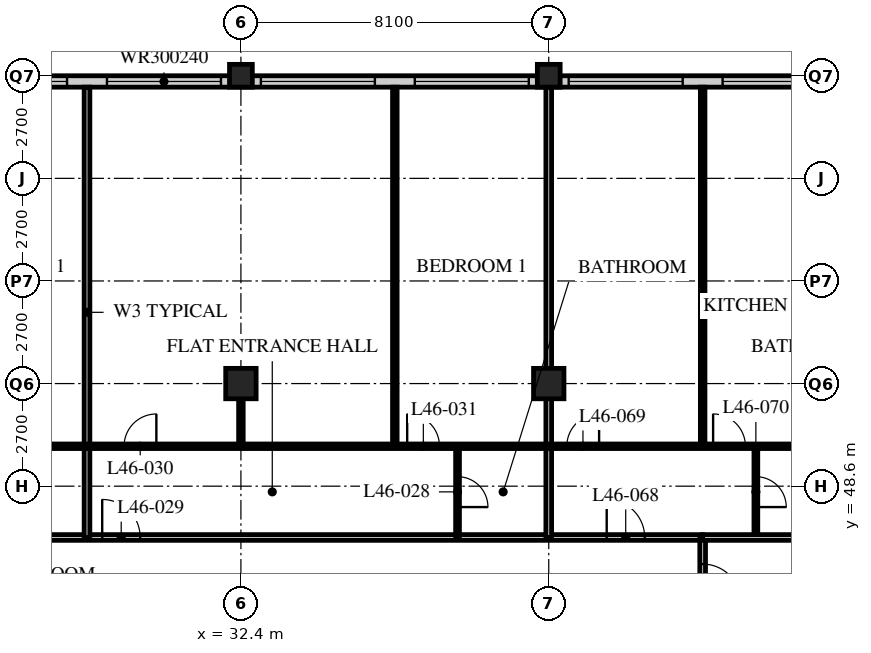
"""IFC4 building model, lengths in metres.
Left out: names, types, materials, properties, quantities, classifications, styles, units other than length and angle.
Written with IfcOpenShell. Run it as: python <this file> out.ifc"""

import sys

from ifc_helpers import new_model, si_unit, direction, frame, frame_2d, origin, origin_2d, place, context, subcontext, project, spatial, rectangle, hollow_rectangle, extrude, element, fill, save


model = new_model("IFC4")
c1 = context("Model", 3, precision=1e-05, world=origin(), true_north=direction((0.0, 1.0)))
c2 = subcontext(c1, "Body", "Model", "MODEL_VIEW")
j1 = project(units=[si_unit("LENGTHUNIT", "METRE"), si_unit("PLANEANGLEUNIT", "RADIAN")], contexts=[c1])
p1 = place(None, origin())
s1 = spatial("IfcSite", under=j1, at=p1, CompositionType="ELEMENT")
p2 = place(p1, origin())
s2 = spatial("IfcBuilding", under=s1, at=p2, CompositionType="ELEMENT")
p3 = place(p2, frame((0.0, 0.0, 181.2)))
s3 = spatial("IfcBuildingStorey", under=s2, at=p3, CompositionType="ELEMENT", Elevation=181.2)
p4 = place(p3, frame((32.4, 51.3, 0.0), z_axis=(0.0, 0.0, 1.0), x_axis=(1.0, 0.0, 0.0)))
e1 = element("IfcColumn", 1, at=p4, inside=s3, PredefinedType="COLUMN", context=c2, shape_type="SweptSolid", body=[
    extrude(hollow_rectangle(XDim=0.8, YDim=0.8, WallThickness=0.08, at=origin_2d()), origin(), (0.0, 0.0, 1.0), 3.6),
])
p5 = place(p3, frame((32.4, 59.4, 0.0), z_axis=(0.0, 0.0, 1.0), x_axis=(1.0, 0.0, 0.0)))
e2 = element("IfcColumn", 2, at=p5, inside=s3, PredefinedType="COLUMN", context=c2, shape_type="SweptSolid", body=[
    extrude(hollow_rectangle(XDim=0.6, YDim=0.6, WallThickness=0.05, at=origin_2d()), origin(), (0.0, 0.0, 1.0), 3.6),
])
p6 = place(p3, frame((40.5, 51.3, 0.0), z_axis=(0.0, 0.0, 1.0), x_axis=(1.0, 0.0, 0.0)))
e3 = element("IfcColumn", 3, at=p6, inside=s3, PredefinedType="COLUMN", context=c2, shape_type="SweptSolid", body=[
    extrude(hollow_rectangle(XDim=0.8, YDim=0.8, WallThickness=0.08, at=origin_2d()), origin(), (0.0, 0.0, 1.0), 3.6),
])
p7 = place(p3, frame((40.5, 59.4, 0.0), z_axis=(0.0, 0.0, 1.0), x_axis=(1.0, 0.0, 0.0)))
e4 = element("IfcColumn", 4, at=p7, inside=s3, PredefinedType="COLUMN", context=c2, shape_type="SweptSolid", body=[
    extrude(hollow_rectangle(XDim=0.6, YDim=0.6, WallThickness=0.05, at=origin_2d()), origin(), (0.0, 0.0, 1.0), 3.6),
])
p8 = place(p3, frame((48.3, 59.25, 0.0), z_axis=(0.0, 0.0, 1.0), x_axis=(-1.0, 0.0, 0.0)))
e5 = element("IfcWall", 5, at=p8, inside=s3, PredefinedType="SOLIDWALL", context=c2, shape_type="SweptSolid", body=[
    extrude(rectangle(XDim=40.2, YDim=0.3, at=frame_2d((20.1, 0.0))), origin(), (0.0, 0.0, 1.0), 3.39),
])
p9 = place(p8, frame((0.225, 0.0, 0.6)))
e6 = element("IfcOpeningElement", 6, at=p9, cuts=e5, PredefinedType="OPENING", context=c2, shape_type="SweptSolid", body=[
    extrude(rectangle(XDim=3.0, YDim=2.4, at=frame_2d((1.5, 1.2))), frame((0.0, 0.16, 0.0), z_axis=(0.0, -1.0, 0.0), x_axis=(1.0, 0.0, 0.0)), (0.0, 0.0, 1.0), 0.32),
])
p10 = place(p8, frame((4.275, 0.0, 0.6)))
e7 = element("IfcOpeningElement", 7, at=p10, cuts=e5, PredefinedType="OPENING", context=c2, shape_type="SweptSolid", body=[
    extrude(rectangle(XDim=3.0, YDim=2.4, at=frame_2d((1.5, 1.2))), frame((0.0, 0.16, 0.0), z_axis=(0.0, -1.0, 0.0), x_axis=(1.0, 0.0, 0.0)), (0.0, 0.0, 1.0), 0.32),
])
p11 = place(p8, frame((8.325, 0.0, 0.6)))
e8 = element("IfcOpeningElement", 8, at=p11, cuts=e5, PredefinedType="OPENING", context=c2, shape_type="SweptSolid", body=[
    extrude(rectangle(XDim=3.0, YDim=2.4, at=frame_2d((1.5, 1.2))), frame((0.0, 0.16, 0.0), z_axis=(0.0, -1.0, 0.0), x_axis=(1.0, 0.0, 0.0)), (0.0, 0.0, 1.0), 0.32),
])
p12 = place(p8, frame((12.375, 0.0, 0.6)))
e9 = element("IfcOpeningElement", 9, at=p12, cuts=e5, PredefinedType="OPENING", context=c2, shape_type="SweptSolid", body=[
    extrude(rectangle(XDim=3.0, YDim=2.4, at=frame_2d((1.5, 1.2))), frame((0.0, 0.16, 0.0), z_axis=(0.0, -1.0, 0.0), x_axis=(1.0, 0.0, 0.0)), (0.0, 0.0, 1.0), 0.32),
])
p13 = place(p8, frame((16.425, 0.0, 0.6)))
e10 = element("IfcOpeningElement", 10, at=p13, cuts=e5, PredefinedType="OPENING", context=c2, shape_type="SweptSolid", body=[
    extrude(rectangle(XDim=3.0, YDim=2.4, at=frame_2d((1.5, 1.2))), frame((0.0, 0.16, 0.0), z_axis=(0.0, -1.0, 0.0), x_axis=(1.0, 0.0, 0.0)), (0.0, 0.0, 1.0), 0.32),
])
p14 = place(p8, frame((20.475, 0.0, 0.6)))
e11 = element("IfcOpeningElement", 11, at=p14, cuts=e5, PredefinedType="OPENING", context=c2, shape_type="SweptSolid", body=[
    extrude(rectangle(XDim=3.0, YDim=2.4, at=frame_2d((1.5, 1.2))), frame((0.0, 0.16, 0.0), z_axis=(0.0, -1.0, 0.0), x_axis=(1.0, 0.0, 0.0)), (0.0, 0.0, 1.0), 0.32),
])
p15 = place(p8, frame((24.525, 0.0, 0.6)))
e12 = element("IfcOpeningElement", 12, at=p15, cuts=e5, PredefinedType="OPENING", context=c2, shape_type="SweptSolid", body=[
    extrude(rectangle(XDim=3.0, YDim=2.4, at=frame_2d((1.5, 1.2))), frame((0.0, 0.16, 0.0), z_axis=(0.0, -1.0, 0.0), x_axis=(1.0, 0.0, 0.0)), (0.0, 0.0, 1.0), 0.32),
])
p16 = place(p8, frame((28.575, 0.0, 0.6)))
e13 = element("IfcOpeningElement", 13, at=p16, cuts=e5, PredefinedType="OPENING", context=c2, shape_type="SweptSolid", body=[
    extrude(rectangle(XDim=3.0, YDim=2.4, at=frame_2d((1.5, 1.2))), frame((0.0, 0.16, 0.0), z_axis=(0.0, -1.0, 0.0), x_axis=(1.0, 0.0, 0.0)), (0.0, 0.0, 1.0), 0.32),
])
p17 = place(p8, frame((32.625, 0.0, 0.6)))
e14 = element("IfcOpeningElement", 14, at=p17, cuts=e5, PredefinedType="OPENING", context=c2, shape_type="SweptSolid", body=[
    extrude(rectangle(XDim=3.0, YDim=2.4, at=frame_2d((1.5, 1.2))), frame((0.0, 0.16, 0.0), z_axis=(0.0, -1.0, 0.0), x_axis=(1.0, 0.0, 0.0)), (0.0, 0.0, 1.0), 0.32),
])
p18 = place(p8, frame((36.675, 0.0, 0.6)))
e15 = element("IfcOpeningElement", 15, at=p18, cuts=e5, PredefinedType="OPENING", context=c2, shape_type="SweptSolid", body=[
    extrude(rectangle(XDim=3.0, YDim=2.4, at=frame_2d((1.5, 1.2))), frame((0.0, 0.16, 0.0), z_axis=(0.0, -1.0, 0.0), x_axis=(1.0, 0.0, 0.0)), (0.0, 0.0, 1.0), 0.32),
])
p19 = place(p3, frame((12.15, 47.25, 0.0), z_axis=(0.0, 0.0, 1.0), x_axis=(1.0, 0.0, 0.0)))
e16 = element("IfcWall", 16, at=p19, inside=s3, PredefinedType="PARTITIONING", context=c2, shape_type="SweptSolid", body=[
    extrude(rectangle(XDim=32.4, YDim=0.15, at=frame_2d((16.2, 0.0))), origin(), (0.0, 0.0, 1.0), 3.39),
])
p20 = place(p19, frame((4.45, 0.0, 0.0)))
e17 = element("IfcOpeningElement", 17, at=p20, cuts=e16, PredefinedType="OPENING", context=c2, shape_type="SweptSolid", body=[
    extrude(rectangle(XDim=1.0, YDim=2.1, at=frame_2d((0.5, 1.05))), frame((0.0, 0.085, 0.0), z_axis=(0.0, -1.0, 0.0), x_axis=(1.0, 0.0, 0.0)), (0.0, 0.0, 1.0), 0.17),
])
p21 = place(p19, frame((16.6, 0.0, 0.0)))
e18 = element("IfcOpeningElement", 18, at=p21, cuts=e16, PredefinedType="OPENING", context=c2, shape_type="SweptSolid", body=[
    extrude(rectangle(XDim=1.0, YDim=2.1, at=frame_2d((0.5, 1.05))), frame((0.0, 0.085, 0.0), z_axis=(0.0, -1.0, 0.0), x_axis=(1.0, 0.0, 0.0)), (0.0, 0.0, 1.0), 0.17),
])
p22 = place(p19, frame((29.875, 0.0, 0.0)))
e19 = element("IfcOpeningElement", 19, at=p22, cuts=e16, PredefinedType="OPENING", context=c2, shape_type="SweptSolid", body=[
    extrude(rectangle(XDim=1.0, YDim=2.1, at=frame_2d((0.5, 1.05))), frame((0.0, 0.085, 0.0), z_axis=(0.0, -1.0, 0.0), x_axis=(1.0, 0.0, 0.0)), (0.0, 0.0, 1.0), 0.17),
])
p23 = place(p19, frame((1.525, 0.0, 0.0)))
e20 = element("IfcOpeningElement", 20, at=p23, cuts=e16, PredefinedType="OPENING", context=c2, shape_type="SweptSolid", body=[
    extrude(rectangle(XDim=1.0, YDim=2.1, at=frame_2d((0.5, 1.05))), frame((0.0, 0.085, 0.0), z_axis=(0.0, -1.0, 0.0), x_axis=(1.0, 0.0, 0.0)), (0.0, 0.0, 1.0), 0.17),
])
p24 = place(p3, frame((44.55, 18.9, 0.0), z_axis=(0.0, 0.0, 1.0), x_axis=(0.0, 1.0, 0.0)))
e21 = element("IfcWall", 21, at=p24, inside=s3, PredefinedType="PARTITIONING", context=c2, shape_type="SweptSolid", body=[
    extrude(rectangle(XDim=28.35, YDim=0.15, at=frame_2d((14.175, 0.0))), origin(), (0.0, 0.0, 1.0), 3.39),
])
p25 = place(p24, frame((0.4, 0.0, 0.0)))
e22 = element("IfcOpeningElement", 22, at=p25, cuts=e21, PredefinedType="OPENING", context=c2, shape_type="SweptSolid", body=[
    extrude(rectangle(XDim=1.0, YDim=2.1, at=frame_2d((0.5, 1.05))), frame((0.0, 0.085, 0.0), z_axis=(0.0, -1.0, 0.0), x_axis=(1.0, 0.0, 0.0)), (0.0, 0.0, 1.0), 0.17),
])
p26 = place(p24, frame((10.45, 0.0, 0.0)))
e23 = element("IfcOpeningElement", 23, at=p26, cuts=e21, PredefinedType="OPENING", context=c2, shape_type="SweptSolid", body=[
    extrude(rectangle(XDim=1.0, YDim=2.1, at=frame_2d((0.5, 1.05))), frame((0.0, 0.085, 0.0), z_axis=(0.0, -1.0, 0.0), x_axis=(1.0, 0.0, 0.0)), (0.0, 0.0, 1.0), 0.17),
])
p27 = place(p24, frame((14.5, 0.0, 0.0)))
e24 = element("IfcOpeningElement", 24, at=p27, cuts=e21, PredefinedType="OPENING", context=c2, shape_type="SweptSolid", body=[
    extrude(rectangle(XDim=1.0, YDim=2.1, at=frame_2d((0.5, 1.05))), frame((0.0, 0.085, 0.0), z_axis=(0.0, -1.0, 0.0), x_axis=(1.0, 0.0, 0.0)), (0.0, 0.0, 1.0), 0.17),
])
p28 = place(p24, frame((16.6, 0.0, 0.0)))
e25 = element("IfcOpeningElement", 25, at=p28, cuts=e21, PredefinedType="OPENING", context=c2, shape_type="SweptSolid", body=[
    extrude(rectangle(XDim=1.0, YDim=2.1, at=frame_2d((0.5, 1.05))), frame((0.0, 0.085, 0.0), z_axis=(0.0, -1.0, 0.0), x_axis=(1.0, 0.0, 0.0)), (0.0, 0.0, 1.0), 0.17),
])
p29 = place(p24, frame((26.65, 0.0, 0.0)))
e26 = element("IfcOpeningElement", 26, at=p29, cuts=e21, PredefinedType="OPENING", context=c2, shape_type="SweptSolid", body=[
    extrude(rectangle(XDim=1.0, YDim=2.1, at=frame_2d((0.5, 1.05))), frame((0.0, 0.085, 0.0), z_axis=(0.0, -1.0, 0.0), x_axis=(1.0, 0.0, 0.0)), (0.0, 0.0, 1.0), 0.17),
])
p30 = place(p3, frame((28.35, 47.25, 0.0), z_axis=(0.0, 0.0, 1.0), x_axis=(0.0, 1.0, 0.0)))
e27 = element("IfcWall", 27, at=p30, inside=s3, PredefinedType="PARTITIONING", context=c2, shape_type="SweptSolid", body=[
    extrude(rectangle(XDim=11.85, YDim=0.15, at=frame_2d((5.925, 0.0))), origin(), (0.0, 0.0, 1.0), 3.39),
])
p31 = place(p3, frame((38.1, 47.25, 0.0), z_axis=(0.0, 0.0, 1.0), x_axis=(0.0, 1.0, 0.0)))
e28 = element("IfcWall", 28, at=p31, inside=s3, PredefinedType="PARTITIONING", context=c2, shape_type="SweptSolid", body=[
    extrude(rectangle(XDim=2.4, YDim=0.1, at=frame_2d((1.2, 0.0))), origin(), (0.0, 0.0, 1.0), 3.39),
])
p32 = place(p31, frame((0.8, 0.0, 0.0)))
e29 = element("IfcOpeningElement", 29, at=p32, cuts=e28, PredefinedType="OPENING", context=c2, shape_type="SweptSolid", body=[
    extrude(rectangle(XDim=0.8, YDim=2.1, at=frame_2d((0.4, 1.05))), frame((0.0, 0.06, 0.0), z_axis=(0.0, -1.0, 0.0), x_axis=(1.0, 0.0, 0.0)), (0.0, 0.0, 1.0), 0.12),
])
p33 = place(p3, frame((36.45, 49.65, 0.0), z_axis=(0.0, 0.0, 1.0), x_axis=(0.0, 1.0, 0.0)))
e30 = element("IfcWall", 30, at=p33, inside=s3, PredefinedType="PARTITIONING", context=c2, shape_type="SweptSolid", body=[
    extrude(rectangle(XDim=9.45, YDim=0.12, at=frame_2d((4.725, 0.0))), origin(), (0.0, 0.0, 1.0), 3.39),
])
p34 = place(p3, frame((45.95, 47.25, 0.0), z_axis=(0.0, 0.0, 1.0), x_axis=(0.0, 1.0, 0.0)))
e31 = element("IfcWall", 31, at=p34, inside=s3, PredefinedType="PARTITIONING", context=c2, shape_type="SweptSolid", body=[
    extrude(rectangle(XDim=2.4, YDim=0.1, at=frame_2d((1.2, 0.0))), origin(), (0.0, 0.0, 1.0), 3.39),
])
p35 = place(p34, frame((0.8, 0.0, 0.0)))
e32 = element("IfcOpeningElement", 32, at=p35, cuts=e31, PredefinedType="OPENING", context=c2, shape_type="SweptSolid", body=[
    extrude(rectangle(XDim=0.8, YDim=2.1, at=frame_2d((0.4, 1.05))), frame((0.0, 0.06, 0.0), z_axis=(0.0, -1.0, 0.0), x_axis=(1.0, 0.0, 0.0)), (0.0, 0.0, 1.0), 0.12),
])
p36 = place(p3, frame((44.55, 49.65, 0.0), z_axis=(0.0, 0.0, 1.0), x_axis=(0.0, 1.0, 0.0)))
e33 = element("IfcWall", 33, at=p36, inside=s3, PredefinedType="PARTITIONING", context=c2, shape_type="SweptSolid", body=[
    extrude(rectangle(XDim=9.45, YDim=0.12, at=frame_2d((4.725, 0.0))), origin(), (0.0, 0.0, 1.0), 3.39),
])
p37 = place(p3, frame((44.55, 47.25, 0.0), z_axis=(0.0, 0.0, 1.0), x_axis=(1.0, 0.0, 0.0)))
e34 = element("IfcWall", 34, at=p37, inside=s3, PredefinedType="PARTITIONING", context=c2, shape_type="SweptSolid", body=[
    extrude(rectangle(XDim=11.85, YDim=0.15, at=frame_2d((5.925, 0.0))), origin(), (0.0, 0.0, 1.0), 3.39),
])
p38 = place(p3, frame((40.5, 47.25, 0.0), z_axis=(0.0, 0.0, 1.0), x_axis=(0.0, 1.0, 0.0)))
e35 = element("IfcWall", 35, at=p38, inside=s3, PredefinedType="PARTITIONING", context=c2, shape_type="SweptSolid", body=[
    extrude(rectangle(XDim=11.85, YDim=0.15, at=frame_2d((5.925, 0.0))), origin(), (0.0, 0.0, 1.0), 2.778),
])
p39 = place(p3, frame((8.15, 49.65, 0.0), z_axis=(0.0, 0.0, 1.0), x_axis=(1.0, 0.0, 0.0)))
e36 = element("IfcWall", 36, at=p39, inside=s3, PredefinedType="PARTITIONING", context=c2, shape_type="SweptSolid", body=[
    extrude(rectangle(XDim=40.4, YDim=0.12, at=frame_2d((20.2, 0.0))), origin(), (0.0, 0.0, 1.0), 3.39),
])
p40 = place(p39, frame((9.025, 0.0, 0.0)))
e37 = element("IfcOpeningElement", 37, at=p40, cuts=e36, PredefinedType="OPENING", context=c2, shape_type="SweptSolid", body=[
    extrude(rectangle(XDim=0.85, YDim=2.1, at=frame_2d((0.425, 1.05))), frame((0.0, 0.07, 0.0), z_axis=(0.0, -1.0, 0.0), x_axis=(1.0, 0.0, 0.0)), (0.0, 0.0, 1.0), 0.14),
])
p41 = place(p39, frame((16.475, 0.0, 0.0)))
e38 = element("IfcOpeningElement", 38, at=p41, cuts=e36, PredefinedType="OPENING", context=c2, shape_type="SweptSolid", body=[
    extrude(rectangle(XDim=0.85, YDim=2.1, at=frame_2d((0.425, 1.05))), frame((0.0, 0.07, 0.0), z_axis=(0.0, -1.0, 0.0), x_axis=(1.0, 0.0, 0.0)), (0.0, 0.0, 1.0), 0.14),
])
p42 = place(p39, frame((21.175, 0.0, 0.0)))
e39 = element("IfcOpeningElement", 39, at=p42, cuts=e36, PredefinedType="OPENING", context=c2, shape_type="SweptSolid", body=[
    extrude(rectangle(XDim=0.85, YDim=2.1, at=frame_2d((0.425, 1.05))), frame((0.0, 0.07, 0.0), z_axis=(0.0, -1.0, 0.0), x_axis=(1.0, 0.0, 0.0)), (0.0, 0.0, 1.0), 0.14),
])
p43 = place(p39, frame((28.625, 0.0, 0.0)))
e40 = element("IfcOpeningElement", 40, at=p43, cuts=e36, PredefinedType="OPENING", context=c2, shape_type="SweptSolid", body=[
    extrude(rectangle(XDim=0.85, YDim=2.1, at=frame_2d((0.425, 1.05))), frame((0.0, 0.07, 0.0), z_axis=(0.0, -1.0, 0.0), x_axis=(1.0, 0.0, 0.0)), (0.0, 0.0, 1.0), 0.14),
])
p44 = place(p39, frame((32.825, 0.0, 0.0)))
e41 = element("IfcOpeningElement", 41, at=p44, cuts=e36, PredefinedType="OPENING", context=c2, shape_type="SweptSolid", body=[
    extrude(rectangle(XDim=0.85, YDim=2.1, at=frame_2d((0.425, 1.05))), frame((0.0, 0.07, 0.0), z_axis=(0.0, -1.0, 0.0), x_axis=(1.0, 0.0, 0.0)), (0.0, 0.0, 1.0), 0.14),
])
p45 = place(p39, frame((36.675, 0.0, 0.0)))
e42 = element("IfcOpeningElement", 42, at=p45, cuts=e36, PredefinedType="OPENING", context=c2, shape_type="SweptSolid", body=[
    extrude(rectangle(XDim=0.85, YDim=2.1, at=frame_2d((0.425, 1.05))), frame((0.0, 0.07, 0.0), z_axis=(0.0, -1.0, 0.0), x_axis=(1.0, 0.0, 0.0)), (0.0, 0.0, 1.0), 0.14),
])
p46 = place(p39, frame((6.725, 0.0, 0.0)))
e43 = element("IfcOpeningElement", 43, at=p46, cuts=e36, PredefinedType="OPENING", context=c2, shape_type="SweptSolid", body=[
    extrude(rectangle(XDim=0.85, YDim=2.1, at=frame_2d((0.425, 1.05))), frame((0.0, 0.07, 0.0), z_axis=(0.0, -1.0, 0.0), x_axis=(1.0, 0.0, 0.0)), (0.0, 0.0, 1.0), 0.14),
])
p47 = place(p39, frame((2.875, 0.0, 0.0)))
e44 = element("IfcOpeningElement", 44, at=p47, cuts=e36, PredefinedType="OPENING", context=c2, shape_type="SweptSolid", body=[
    extrude(rectangle(XDim=0.85, YDim=2.1, at=frame_2d((0.425, 1.05))), frame((0.0, 0.07, 0.0), z_axis=(0.0, -1.0, 0.0), x_axis=(1.0, 0.0, 0.0)), (0.0, 0.0, 1.0), 0.14),
])
p48 = place(p3, frame((32.4, 49.65, 0.0), z_axis=(0.0, 0.0, 1.0), x_axis=(0.0, 1.0, 0.0)))
e45 = element("IfcWall", 45, at=p48, inside=s3, PredefinedType="PARTITIONING", context=c2, shape_type="SweptSolid", body=[
    extrude(rectangle(XDim=1.25, YDim=0.12, at=frame_2d((0.625, 0.0))), origin(), (0.0, 0.0, 1.0), 2.778),
])
p49 = place(p9, origin())
e46 = element("IfcWindow", 46, at=p49, inside=s3, PartitioningType="SINGLE_PANEL", PredefinedType="WINDOW", context=c2, shape_type="SweptSolid", body=[
    extrude(rectangle(XDim=3.0, YDim=2.4, at=frame_2d((1.5, 1.2))), frame((0.0, 0.03, 0.0), z_axis=(0.0, -1.0, 0.0), x_axis=(1.0, 0.0, 0.0)), (0.0, 0.0, 1.0), 0.06),
])
fill(e6, e46)
p50 = place(p10, origin())
e47 = element("IfcWindow", 47, at=p50, inside=s3, PartitioningType="SINGLE_PANEL", PredefinedType="WINDOW", context=c2, shape_type="SweptSolid", body=[
    extrude(rectangle(XDim=3.0, YDim=2.4, at=frame_2d((1.5, 1.2))), frame((0.0, 0.03, 0.0), z_axis=(0.0, -1.0, 0.0), x_axis=(1.0, 0.0, 0.0)), (0.0, 0.0, 1.0), 0.06),
])
fill(e7, e47)
p51 = place(p11, origin())
e48 = element("IfcWindow", 48, at=p51, inside=s3, PartitioningType="SINGLE_PANEL", PredefinedType="WINDOW", context=c2, shape_type="SweptSolid", body=[
    extrude(rectangle(XDim=3.0, YDim=2.4, at=frame_2d((1.5, 1.2))), frame((0.0, 0.03, 0.0), z_axis=(0.0, -1.0, 0.0), x_axis=(1.0, 0.0, 0.0)), (0.0, 0.0, 1.0), 0.06),
])
fill(e8, e48)
p52 = place(p12, origin())
e49 = element("IfcWindow", 49, at=p52, inside=s3, PartitioningType="SINGLE_PANEL", PredefinedType="WINDOW", context=c2, shape_type="SweptSolid", body=[
    extrude(rectangle(XDim=3.0, YDim=2.4, at=frame_2d((1.5, 1.2))), frame((0.0, 0.03, 0.0), z_axis=(0.0, -1.0, 0.0), x_axis=(1.0, 0.0, 0.0)), (0.0, 0.0, 1.0), 0.06),
])
fill(e9, e49)
p53 = place(p13, origin())
e50 = element("IfcWindow", 50, at=p53, inside=s3, PartitioningType="SINGLE_PANEL", PredefinedType="WINDOW", context=c2, shape_type="SweptSolid", body=[
    extrude(rectangle(XDim=3.0, YDim=2.4, at=frame_2d((1.5, 1.2))), frame((0.0, 0.03, 0.0), z_axis=(0.0, -1.0, 0.0), x_axis=(1.0, 0.0, 0.0)), (0.0, 0.0, 1.0), 0.06),
])
fill(e10, e50)
p54 = place(p14, origin())
e51 = element("IfcWindow", 51, at=p54, inside=s3, PartitioningType="SINGLE_PANEL", PredefinedType="WINDOW", context=c2, shape_type="SweptSolid", body=[
    extrude(rectangle(XDim=3.0, YDim=2.4, at=frame_2d((1.5, 1.2))), frame((0.0, 0.03, 0.0), z_axis=(0.0, -1.0, 0.0), x_axis=(1.0, 0.0, 0.0)), (0.0, 0.0, 1.0), 0.06),
])
fill(e11, e51)
p55 = place(p32, origin())
e52 = element("IfcDoor", 52, at=p55, inside=s3, OperationType="SINGLE_SWING_RIGHT", PredefinedType="DOOR", context=c2, shape_type="SweptSolid", body=[
    extrude(rectangle(XDim=0.8, YDim=2.1, at=frame_2d((0.4, 1.05))), frame((0.0, 0.025, 0.0), z_axis=(0.0, -1.0, 0.0), x_axis=(1.0, 0.0, 0.0)), (0.0, 0.0, 1.0), 0.05),
])
fill(e29, e52)
p56 = place(p21, origin())
e53 = element("IfcDoor", 53, at=p56, inside=s3, OperationType="SINGLE_SWING_LEFT", PredefinedType="DOOR", context=c2, shape_type="SweptSolid", body=[
    extrude(rectangle(XDim=1.0, YDim=2.1, at=frame_2d((0.5, 1.05))), frame((0.0, 0.025, 0.0), z_axis=(0.0, -1.0, 0.0), x_axis=(1.0, 0.0, 0.0)), (0.0, 0.0, 1.0), 0.05),
])
fill(e18, e53)
p57 = place(p42, origin())
e54 = element("IfcDoor", 54, at=p57, inside=s3, OperationType="SINGLE_SWING_RIGHT", PredefinedType="DOOR", context=c2, shape_type="SweptSolid", body=[
    extrude(rectangle(XDim=0.85, YDim=2.1, at=frame_2d((0.425, 1.05))), frame((0.0, 0.025, 0.0), z_axis=(0.0, -1.0, 0.0), x_axis=(1.0, 0.0, 0.0)), (0.0, 0.0, 1.0), 0.05),
])
fill(e39, e54)
p58 = place(p43, origin())
e55 = element("IfcDoor", 55, at=p58, inside=s3, OperationType="SINGLE_SWING_LEFT", PredefinedType="DOOR", context=c2, shape_type="SweptSolid", body=[
    extrude(rectangle(XDim=0.85, YDim=2.1, at=frame_2d((0.425, 1.05))), frame((0.0, 0.025, 0.0), z_axis=(0.0, -1.0, 0.0), x_axis=(1.0, 0.0, 0.0)), (0.0, 0.0, 1.0), 0.05),
])
fill(e40, e55)
p59 = place(p29, origin())
e56 = element("IfcDoor", 56, at=p59, inside=s3, OperationType="SINGLE_SWING_RIGHT", PredefinedType="DOOR", context=c2, shape_type="SweptSolid", body=[
    extrude(rectangle(XDim=1.0, YDim=2.1, at=frame_2d((0.5, 1.05))), frame((0.0, 0.025, 0.0), z_axis=(0.0, -1.0, 0.0), x_axis=(1.0, 0.0, 0.0)), (0.0, 0.0, 1.0), 0.05),
])
fill(e26, e56)
p60 = place(p22, origin())
e57 = element("IfcDoor", 57, at=p60, inside=s3, OperationType="SINGLE_SWING_LEFT", PredefinedType="DOOR", context=c2, shape_type="SweptSolid", body=[
    extrude(rectangle(XDim=1.0, YDim=2.1, at=frame_2d((0.5, 1.05))), frame((0.0, 0.025, 0.0), z_axis=(0.0, -1.0, 0.0), x_axis=(1.0, 0.0, 0.0)), (0.0, 0.0, 1.0), 0.05),
])
fill(e19, e57)
p61 = place(p44, origin())
e58 = element("IfcDoor", 58, at=p61, inside=s3, OperationType="SINGLE_SWING_RIGHT", PredefinedType="DOOR", context=c2, shape_type="SweptSolid", body=[
    extrude(rectangle(XDim=0.85, YDim=2.1, at=frame_2d((0.425, 1.05))), frame((0.0, 0.025, 0.0), z_axis=(0.0, -1.0, 0.0), x_axis=(1.0, 0.0, 0.0)), (0.0, 0.0, 1.0), 0.05),
])
fill(e41, e58)
p62 = place(p35, origin())
e59 = element("IfcDoor", 59, at=p62, inside=s3, OperationType="SINGLE_SWING_RIGHT", PredefinedType="DOOR", context=c2, shape_type="SweptSolid", body=[
    extrude(rectangle(XDim=0.8, YDim=2.1, at=frame_2d((0.4, 1.05))), frame((0.0, 0.025, 0.0), z_axis=(0.0, -1.0, 0.0), x_axis=(1.0, 0.0, 0.0)), (0.0, 0.0, 1.0), 0.05),
])
fill(e32, e59)
p63 = place(p45, origin())
e60 = element("IfcDoor", 60, at=p63, inside=s3, OperationType="SINGLE_SWING_LEFT", PredefinedType="DOOR", context=c2, shape_type="SweptSolid", body=[
    extrude(rectangle(XDim=0.85, YDim=2.1, at=frame_2d((0.425, 1.05))), frame((0.0, 0.025, 0.0), z_axis=(0.0, -1.0, 0.0), x_axis=(1.0, 0.0, 0.0)), (0.0, 0.0, 1.0), 0.05),
])
fill(e42, e60)
save(model, sys.argv[1])
